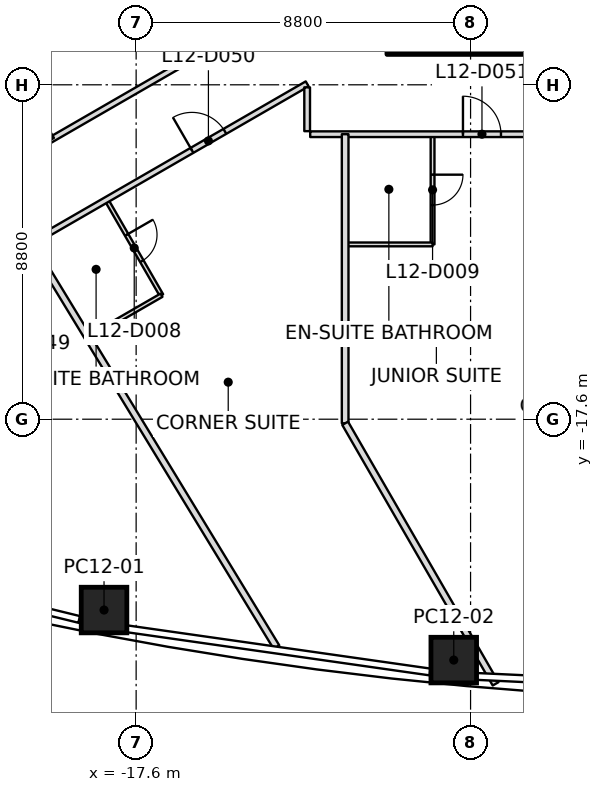
"""IFC4 building model, lengths in metres.
Left out: names, types, materials, properties, quantities, classifications, styles, units other than length and angle.
Written with IfcOpenShell. Run it as: python <this file> out.ifc"""

import sys

from ifc_helpers import new_model, si_unit, direction, frame, frame_2d, origin, origin_2d, place, context, subcontext, project, spatial, rectangle, extrude, clip, halfspace, element, fill, save


model = new_model("IFC4")
c1 = context("Model", 3, precision=1e-05, world=origin(), true_north=direction((0.0, 1.0)))
c2 = subcontext(c1, "Body", "Model", "MODEL_VIEW")
j1 = project(units=[si_unit("LENGTHUNIT", "METRE"), si_unit("PLANEANGLEUNIT", "RADIAN")], contexts=[c1])
p1 = place(None, origin())
s1 = spatial("IfcSite", under=j1, at=p1, CompositionType="ELEMENT")
p2 = place(p1, origin())
s2 = spatial("IfcBuilding", under=s1, at=p2, CompositionType="ELEMENT")
p3 = place(p2, frame((0.0, 0.0, 66.5)))
s3 = spatial("IfcBuildingStorey", under=s2, at=p3, CompositionType="ELEMENT", Elevation=66.5)
p4 = place(p3, frame((-18.445, -22.622, 0.0), z_axis=(0.019018956694, 0.15899066195, 0.987096879085), x_axis=(-0.981890485807, 0.189097653635, -0.011539119147)))
e1 = element("IfcColumn", 1, at=p4, inside=s3, PredefinedType="COLUMN", context=c2, shape_type="SweptSolid", body=[
    clip(clip(extrude(rectangle(XDim=1.2, YDim=1.2, at=origin_2d()), origin(), (0.0, 0.0, 1.0), 3.748), halfspace(frame((0.0, 0.0, 0.006)), True)), halfspace(frame((0.0, 0.0, 3.734)), False)),
])
p5 = place(p3, frame((-9.242, -23.939, 0.0), z_axis=(0.00942953432, 0.204607977573, 0.978798579584), x_axis=(0.990215317111, -0.138199898552, 0.019349775144)))
e2 = element("IfcColumn", 2, at=p5, inside=s3, PredefinedType="COLUMN", context=c2, shape_type="SweptSolid", body=[
    clip(clip(extrude(rectangle(XDim=1.2, YDim=1.2, at=origin_2d()), origin(), (0.0, 0.0, 1.0), 3.78), halfspace(frame((0.0, 0.0, 0.007)), True)), halfspace(frame((0.0, 0.0, 3.762)), False)),
])
p6 = place(p3, frame((-11.0, -7.75, 0.0), z_axis=(0.0, 0.0, 1.0), x_axis=(1.0, 0.0, 0.0)))
e3 = element("IfcWall", 3, at=p6, inside=s3, PredefinedType="SHEAR", context=c2, shape_type="SweptSolid", body=[
    extrude(rectangle(XDim=22.0, YDim=0.5, at=frame_2d((11.0, 0.0))), origin(), (0.0, 0.0, 1.0), 3.7),
])
p7 = place(p6, frame((10.45, 0.0, 0.0)))
e4 = element("IfcOpeningElement", 4, at=p7, cuts=e3, PredefinedType="OPENING", context=c2, shape_type="SweptSolid", body=[
    extrude(rectangle(XDim=1.1, YDim=2.1, at=frame_2d((0.55, 1.05))), frame((0.0, 0.25, 0.0), z_axis=(0.0, -1.0, 0.0), x_axis=(1.0, 0.0, 0.0)), (0.0, 0.0, 1.0), 0.5),
])
p8 = place(p3, frame((-19.84, -10.242, 0.0), z_axis=(0.0, 0.0, 1.0), x_axis=(-0.499991787927, 0.866030144975, 0.0)))
e5 = element("IfcWall", 5, at=p8, inside=s3, PredefinedType="PARTITIONING", context=c2, shape_type="SweptSolid", body=[
    extrude(rectangle(XDim=12.084, YDim=0.175, at=frame_2d((6.042, 0.0))), origin(), (0.0, 0.0, 1.0), 2.934),
])
p9 = place(p3, frame((-13.908, -23.596, 0.0), z_axis=(0.0, 0.0, 1.0), x_axis=(-0.520049098653, 0.854136367912, 0.0)))
e6 = element("IfcWall", 6, at=p9, inside=s3, PredefinedType="PARTITIONING", context=c2, shape_type="SweptSolid", body=[
    extrude(rectangle(XDim=12.434, YDim=0.175, at=frame_2d((6.217, 0.0))), origin(), (0.0, 0.0, 1.0), 2.934),
])
p10 = place(p3, frame((-12.1, -10.1, 0.0), z_axis=(0.0, 0.0, 1.0), x_axis=(0.0, -1.0, 0.0)))
e7 = element("IfcWall", 7, at=p10, inside=s3, PredefinedType="PARTITIONING", context=c2, shape_type="SweptSolid", body=[
    extrude(rectangle(XDim=7.608, YDim=0.175, at=frame_2d((3.804, 0.0))), origin(), (0.0, 0.0, 1.0), 3.15),
])
p11 = place(p3, frame((-12.1, -17.708, 0.0), z_axis=(0.0, 0.0, 1.0), x_axis=(0.500006299954, -0.866021766474, 0.0)))
e8 = element("IfcWall", 8, at=p11, inside=s3, PredefinedType="PARTITIONING", context=c2, shape_type="SweptSolid", body=[
    extrude(rectangle(XDim=7.917, YDim=0.175, at=frame_2d((3.958, 0.0))), origin(), (0.0, 0.0, 1.0), 3.15),
])
p12 = place(p3, frame((-13.1, -6.351, 0.0), z_axis=(0.0, 0.0, 1.0), x_axis=(-0.86601949893, -0.500010227369, 0.0)))
e9 = element("IfcWall", 9, at=p12, inside=s3, PredefinedType="PARTITIONING", context=c2, shape_type="SweptSolid", body=[
    extrude(rectangle(XDim=12.582, YDim=0.15, at=frame_2d((6.291, 0.0))), origin(), (0.0, 0.0, 1.0), 2.947),
])
p13 = place(p12, frame((10.882, 0.0, 0.0)))
e10 = element("IfcOpeningElement", 10, at=p13, cuts=e9, PredefinedType="OPENING", context=c2, shape_type="SweptSolid", body=[
    extrude(rectangle(XDim=1.0, YDim=2.1, at=frame_2d((0.5, 1.05))), frame((0.0, 0.075, 0.0), z_axis=(0.0, -1.0, 0.0), x_axis=(1.0, 0.0, 0.0)), (0.0, 0.0, 1.0), 0.15),
])
p14 = place(p3, frame((-22.877, -14.421, 0.0), z_axis=(0.0, 0.0, 1.0), x_axis=(0.86601740905, 0.500013847031, 0.0)))
e11 = element("IfcWall", 11, at=p14, inside=s3, PredefinedType="PARTITIONING", context=c2, shape_type="SweptSolid", body=[
    extrude(rectangle(XDim=11.29, YDim=0.15, at=frame_2d((5.645, 0.0))), origin(), (0.0, 0.0, 1.0), 2.797),
])
p15 = place(p14, frame((0.895, 0.0, 0.0)))
e12 = element("IfcOpeningElement", 12, at=p15, cuts=e11, PredefinedType="OPENING", context=c2, shape_type="SweptSolid", body=[
    extrude(rectangle(XDim=1.0, YDim=2.1, at=frame_2d((0.5, 1.05))), frame((0.0, 0.075, 0.0), z_axis=(0.0, -1.0, 0.0), x_axis=(1.0, 0.0, 0.0)), (0.0, 0.0, 1.0), 0.15),
])
p16 = place(p14, frame((7.79, 0.0, 0.0)))
e13 = element("IfcOpeningElement", 13, at=p16, cuts=e11, PredefinedType="OPENING", context=c2, shape_type="SweptSolid", body=[
    extrude(rectangle(XDim=1.0, YDim=2.1, at=frame_2d((0.5, 1.05))), frame((0.0, 0.075, 0.0), z_axis=(0.0, -1.0, 0.0), x_axis=(1.0, 0.0, 0.0)), (0.0, 0.0, 1.0), 0.15),
])
p17 = place(p3, frame((-13.1, -8.867, 0.0), z_axis=(0.0, 0.0, 1.0), x_axis=(0.0, -1.0, 0.0)))
e14 = element("IfcWall", 14, at=p17, inside=s3, PredefinedType="PARTITIONING", context=c2, shape_type="SweptSolid", body=[
    extrude(rectangle(XDim=1.153, YDim=0.15, at=frame_2d((0.576, 0.0))), origin(), (0.0, 0.0, 1.0), 2.797),
])
p18 = place(p3, frame((-13.02, -10.1, 0.0), z_axis=(0.0, 0.0, 1.0), x_axis=(1.0, 0.0, 0.0)))
e15 = element("IfcWall", 15, at=p18, inside=s3, PredefinedType="PARTITIONING", context=c2, shape_type="SweptSolid", body=[
    extrude(rectangle(XDim=26.04, YDim=0.15, at=frame_2d((13.02, 0.0))), origin(), (0.0, 0.0, 1.0), 2.947),
])
p19 = place(p18, frame((4.02, 0.0, 0.0)))
e16 = element("IfcOpeningElement", 16, at=p19, cuts=e15, PredefinedType="OPENING", context=c2, shape_type="SweptSolid", body=[
    extrude(rectangle(XDim=1.0, YDim=2.1, at=frame_2d((0.5, 1.05))), frame((0.0, 0.075, 0.0), z_axis=(0.0, -1.0, 0.0), x_axis=(1.0, 0.0, 0.0)), (0.0, 0.0, 1.0), 0.15),
])
p20 = place(p18, frame((7.02, 0.0, 0.0)))
e17 = element("IfcOpeningElement", 17, at=p20, cuts=e15, PredefinedType="OPENING", context=c2, shape_type="SweptSolid", body=[
    extrude(rectangle(XDim=1.0, YDim=2.1, at=frame_2d((0.5, 1.05))), frame((0.0, 0.075, 0.0), z_axis=(0.0, -1.0, 0.0), x_axis=(1.0, 0.0, 0.0)), (0.0, 0.0, 1.0), 0.15),
])
p21 = place(p18, frame((12.12, 0.0, 0.0)))
e18 = element("IfcOpeningElement", 18, at=p21, cuts=e15, PredefinedType="OPENING", context=c2, shape_type="SweptSolid", body=[
    extrude(rectangle(XDim=1.0, YDim=2.1, at=frame_2d((0.5, 1.05))), frame((0.0, 0.075, 0.0), z_axis=(0.0, -1.0, 0.0), x_axis=(1.0, 0.0, 0.0)), (0.0, 0.0, 1.0), 0.15),
])
p22 = place(p18, frame((16.62, 0.0, 0.0)))
e19 = element("IfcOpeningElement", 19, at=p22, cuts=e15, PredefinedType="OPENING", context=c2, shape_type="SweptSolid", body=[
    extrude(rectangle(XDim=1.0, YDim=2.1, at=frame_2d((0.5, 1.05))), frame((0.0, 0.075, 0.0), z_axis=(0.0, -1.0, 0.0), x_axis=(1.0, 0.0, 0.0)), (0.0, 0.0, 1.0), 0.15),
])
p23 = place(p18, frame((19.62, 0.0, 0.0)))
e20 = element("IfcOpeningElement", 20, at=p23, cuts=e15, PredefinedType="OPENING", context=c2, shape_type="SweptSolid", body=[
    extrude(rectangle(XDim=1.0, YDim=2.1, at=frame_2d((0.5, 1.05))), frame((0.0, 0.075, 0.0), z_axis=(0.0, -1.0, 0.0), x_axis=(1.0, 0.0, 0.0)), (0.0, 0.0, 1.0), 0.15),
])
p24 = place(p3, frame((-18.368, -11.852, 0.0), z_axis=(0.0, 0.0, 1.0), x_axis=(0.500036638401, -0.866004249561, 0.0)))
e21 = element("IfcWall", 21, at=p24, inside=s3, PredefinedType="PARTITIONING", context=c2, shape_type="SweptSolid", body=[
    extrude(rectangle(XDim=2.87, YDim=0.1, at=frame_2d((1.435, 0.0))), origin(), (0.0, 0.0, 1.0), 3.15),
])
p25 = place(p24, frame((1.035, 0.0, 0.0)))
e22 = element("IfcOpeningElement", 22, at=p25, cuts=e21, PredefinedType="OPENING", context=c2, shape_type="SweptSolid", body=[
    extrude(rectangle(XDim=0.8, YDim=2.1, at=frame_2d((0.4, 1.05))), frame((0.0, 0.05, 0.0), z_axis=(0.0, -1.0, 0.0), x_axis=(1.0, 0.0, 0.0)), (0.0, 0.0, 1.0), 0.1),
])
p26 = place(p3, frame((-16.933, -14.337, 0.0), z_axis=(0.0, 0.0, 1.0), x_axis=(-0.866017224141, -0.500014167291, 0.0)))
e23 = element("IfcWall", 23, at=p26, inside=s3, PredefinedType="PARTITIONING", context=c2, shape_type="SweptSolid", body=[
    extrude(rectangle(XDim=2.27, YDim=0.1, at=frame_2d((1.135, 0.0))), origin(), (0.0, 0.0, 1.0), 3.15),
])
p27 = place(p3, frame((-9.8, -10.13, 0.0), z_axis=(0.0, 0.0, 1.0), x_axis=(0.0, -1.0, 0.0)))
e24 = element("IfcWall", 24, at=p27, inside=s3, PredefinedType="PARTITIONING", context=c2, shape_type="SweptSolid", body=[
    extrude(rectangle(XDim=2.87, YDim=0.1, at=frame_2d((1.435, 0.0))), origin(), (0.0, 0.0, 1.0), 3.15),
])
p28 = place(p27, frame((1.035, 0.0, 0.0)))
e25 = element("IfcOpeningElement", 25, at=p28, cuts=e24, PredefinedType="OPENING", context=c2, shape_type="SweptSolid", body=[
    extrude(rectangle(XDim=0.8, YDim=2.1, at=frame_2d((0.4, 1.05))), frame((0.0, 0.05, 0.0), z_axis=(0.0, -1.0, 0.0), x_axis=(1.0, 0.0, 0.0)), (0.0, 0.0, 1.0), 0.1),
])
p29 = place(p3, frame((-9.8, -13.0, 0.0), z_axis=(0.0, 0.0, 1.0), x_axis=(-1.0, 0.0, 0.0)))
e26 = element("IfcWall", 26, at=p29, inside=s3, PredefinedType="PARTITIONING", context=c2, shape_type="SweptSolid", body=[
    extrude(rectangle(XDim=2.27, YDim=0.1, at=frame_2d((1.135, 0.0))), origin(), (0.0, 0.0, 1.0), 3.15),
])
p30 = place(p16, origin())
e27 = element("IfcDoor", 27, at=p30, inside=s3, OperationType="SINGLE_SWING_LEFT", PredefinedType="DOOR", context=c2, shape_type="SweptSolid", body=[
    extrude(rectangle(XDim=1.0, YDim=2.1, at=frame_2d((0.5, 1.05))), frame((0.0, 0.025, 0.0), z_axis=(0.0, -1.0, 0.0), x_axis=(1.0, 0.0, 0.0)), (0.0, 0.0, 1.0), 0.05),
])
fill(e13, e27)
p31 = place(p25, origin())
e28 = element("IfcDoor", 28, at=p31, inside=s3, OperationType="SINGLE_SWING_RIGHT", PredefinedType="DOOR", context=c2, shape_type="SweptSolid", body=[
    extrude(rectangle(XDim=0.8, YDim=2.1, at=frame_2d((0.4, 1.05))), frame((0.0, 0.025, 0.0), z_axis=(0.0, -1.0, 0.0), x_axis=(1.0, 0.0, 0.0)), (0.0, 0.0, 1.0), 0.05),
])
fill(e22, e28)
p32 = place(p19, origin())
e29 = element("IfcDoor", 29, at=p32, inside=s3, OperationType="SINGLE_SWING_LEFT", PredefinedType="DOOR", context=c2, shape_type="SweptSolid", body=[
    extrude(rectangle(XDim=1.0, YDim=2.1, at=frame_2d((0.5, 1.05))), frame((0.0, 0.025, 0.0), z_axis=(0.0, -1.0, 0.0), x_axis=(1.0, 0.0, 0.0)), (0.0, 0.0, 1.0), 0.05),
])
fill(e16, e29)
p33 = place(p28, origin())
e30 = element("IfcDoor", 30, at=p33, inside=s3, OperationType="SINGLE_SWING_LEFT", PredefinedType="DOOR", context=c2, shape_type="SweptSolid", body=[
    extrude(rectangle(XDim=0.8, YDim=2.1, at=frame_2d((0.4, 1.05))), frame((0.0, 0.025, 0.0), z_axis=(0.0, -1.0, 0.0), x_axis=(1.0, 0.0, 0.0)), (0.0, 0.0, 1.0), 0.05),
])
fill(e25, e30)
save(model, sys.argv[1])
